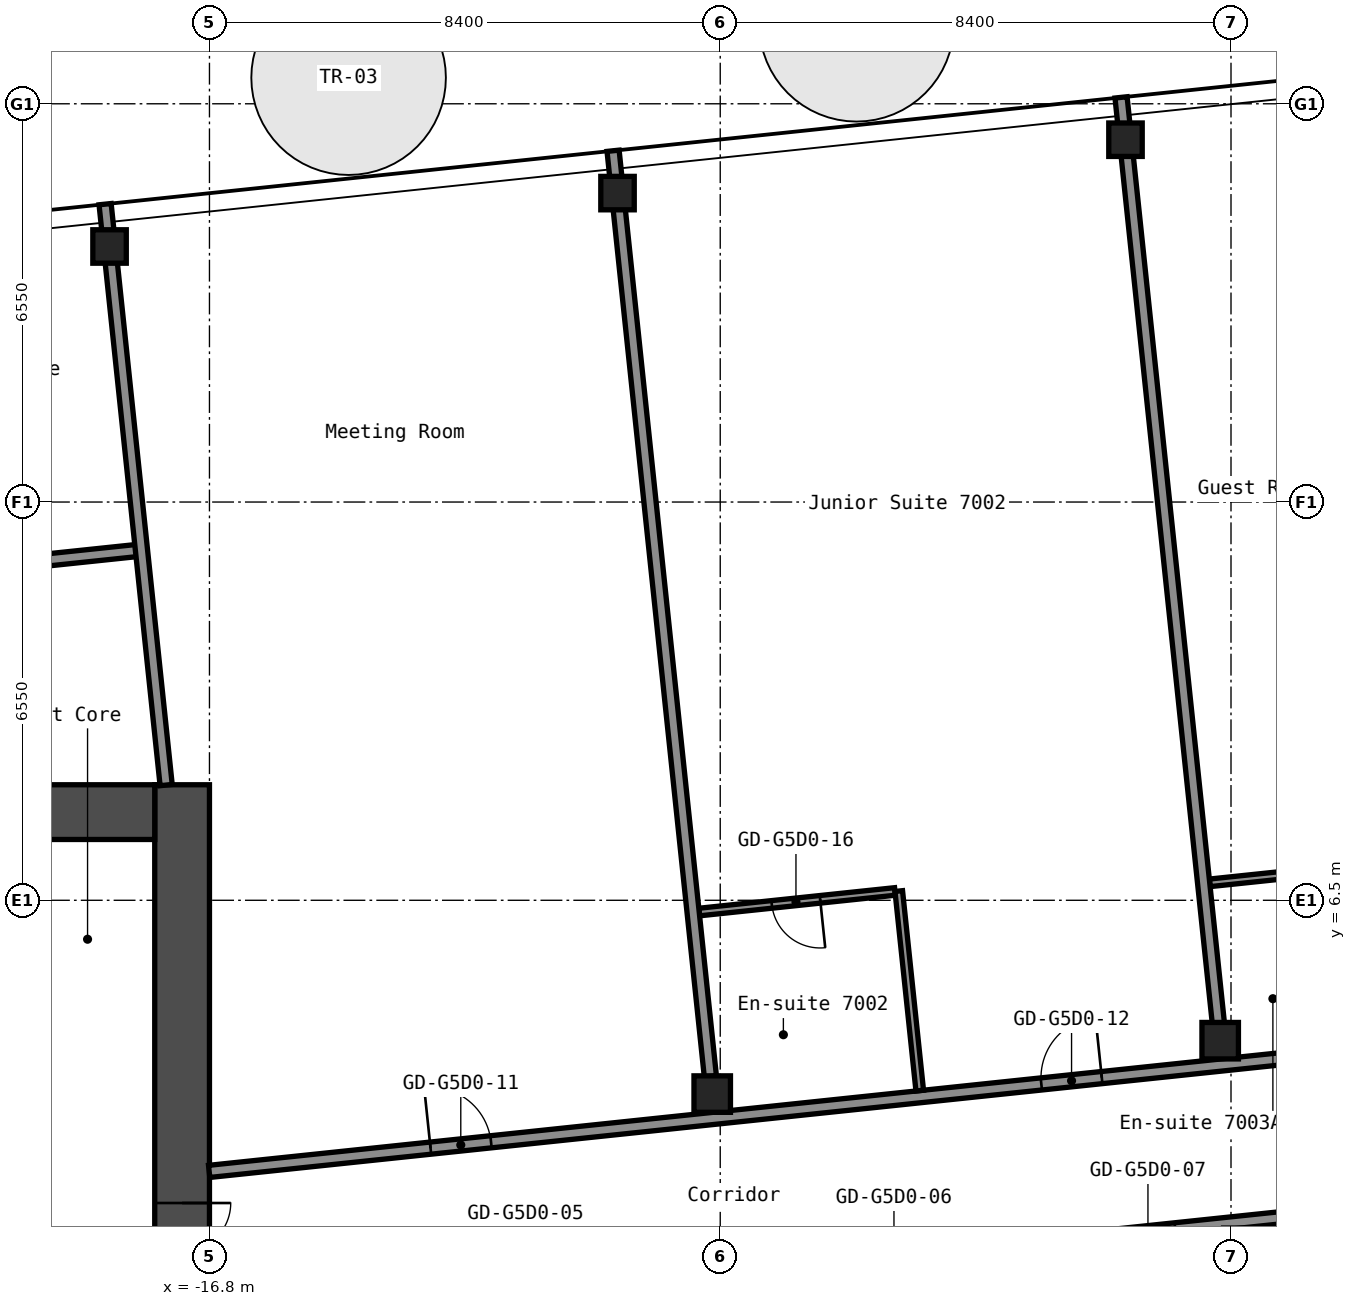
"""IFC4 building model, lengths in metres.
Left out: names, types, materials, properties, quantities, classifications, styles, units other than length and angle.
Written with IfcOpenShell. Run it as: python <this file> out.ifc"""

import sys

from ifc_helpers import new_model, si_unit, direction, frame, frame_2d, origin, origin_2d, place, context, subcontext, project, spatial, rectangle, hollow_rectangle, extrude, element, fill, save


model = new_model("IFC4")
c1 = context("Model", 3, precision=1e-05, world=origin(), true_north=direction((0.0, 1.0)))
c2 = subcontext(c1, "Body", "Model", "MODEL_VIEW")
j1 = project(units=[si_unit("LENGTHUNIT", "METRE"), si_unit("PLANEANGLEUNIT", "RADIAN")], contexts=[c1])
p1 = place(None, origin())
s1 = spatial("IfcSite", under=j1, at=p1, CompositionType="ELEMENT")
p2 = place(p1, origin())
s2 = spatial("IfcBuilding", under=s1, at=p2, CompositionType="ELEMENT")
p3 = place(p2, frame((0.0, 0.0, 248.6)))
s3 = spatial("IfcBuildingStorey", under=s2, at=p3, CompositionType="ELEMENT", Elevation=248.6)
p4 = place(p3, frame((-18.443, 17.253, 0.0), z_axis=(0.0, 0.0, 1.0), x_axis=(1.0, 0.0, 0.0)))
e1 = element("IfcColumn", 1, at=p4, inside=s3, PredefinedType="COLUMN", context=c2, shape_type="SweptSolid", body=[
    extrude(hollow_rectangle(XDim=0.55, YDim=0.55, WallThickness=0.022, InnerFilletRadius=0.033, OuterFilletRadius=0.055, at=origin_2d()), origin(), (0.0, 0.0, 1.0), 2.75),
])
p5 = place(p3, frame((-8.532, 3.312, 0.0), z_axis=(0.0, 0.0, 1.0), x_axis=(1.0, 0.0, 0.0)))
e2 = element("IfcColumn", 2, at=p5, inside=s3, PredefinedType="COLUMN", context=c2, shape_type="SweptSolid", body=[
    extrude(hollow_rectangle(XDim=0.6, YDim=0.6, WallThickness=0.025, InnerFilletRadius=0.038, OuterFilletRadius=0.062, at=origin_2d()), origin(), (0.0, 0.0, 1.0), 2.75),
])
p6 = place(p3, frame((-10.089, 18.131, 0.0), z_axis=(0.0, 0.0, 1.0), x_axis=(1.0, 0.0, 0.0)))
e3 = element("IfcColumn", 3, at=p6, inside=s3, PredefinedType="COLUMN", context=c2, shape_type="SweptSolid", body=[
    extrude(hollow_rectangle(XDim=0.55, YDim=0.55, WallThickness=0.022, InnerFilletRadius=0.033, OuterFilletRadius=0.055, at=origin_2d()), origin(), (0.0, 0.0, 1.0), 2.75),
])
p7 = place(p3, frame((-0.178, 4.191, 0.0), z_axis=(0.0, 0.0, 1.0), x_axis=(1.0, 0.0, 0.0)))
e4 = element("IfcColumn", 4, at=p7, inside=s3, PredefinedType="COLUMN", context=c2, shape_type="SweptSolid", body=[
    extrude(hollow_rectangle(XDim=0.6, YDim=0.6, WallThickness=0.025, InnerFilletRadius=0.038, OuterFilletRadius=0.062, at=origin_2d()), origin(), (0.0, 0.0, 1.0), 2.75),
])
p8 = place(p3, frame((-1.735, 19.009, 0.0), z_axis=(0.0, 0.0, 1.0), x_axis=(1.0, 0.0, 0.0)))
e5 = element("IfcColumn", 5, at=p8, inside=s3, PredefinedType="COLUMN", context=c2, shape_type="SweptSolid", body=[
    extrude(hollow_rectangle(XDim=0.55, YDim=0.55, WallThickness=0.022, InnerFilletRadius=0.033, OuterFilletRadius=0.055, at=origin_2d()), origin(), (0.0, 0.0, 1.0), 2.75),
])
p9 = place(p3, frame((-17.25, -8.4, 0.0), z_axis=(0.0, 0.0, 1.0), x_axis=(0.0, 1.0, 0.0)))
e6 = element("IfcWall", 6, at=p9, inside=s3, PredefinedType="SHEAR", context=c2, shape_type="SweptSolid", body=[
    extrude(rectangle(XDim=16.8, YDim=0.9, at=frame_2d((8.4, 0.0))), origin(), (0.0, 0.0, 1.0), 2.75),
])
p10 = place(p9, frame((8.321, 0.0, 0.0)))
e7 = element("IfcOpeningElement", 7, at=p10, cuts=e6, PredefinedType="OPENING", context=c2, shape_type="SweptSolid", body=[
    extrude(rectangle(XDim=1.6, YDim=2.1, at=frame_2d((0.8, 1.05))), frame((0.0, 0.46, 0.0), z_axis=(0.0, -1.0, 0.0), x_axis=(1.0, 0.0, 0.0)), (0.0, 0.0, 1.0), 0.92),
])
p11 = place(p3, frame((-32.7, 7.95, 0.0), z_axis=(0.0, 0.0, 1.0), x_axis=(1.0, 0.0, 0.0)))
e8 = element("IfcWall", 8, at=p11, inside=s3, PredefinedType="SHEAR", context=c2, shape_type="SweptSolid", body=[
    extrude(rectangle(XDim=15.0, YDim=0.9, at=frame_2d((7.5, 0.0))), origin(), (0.0, 0.0, 1.0), 2.75),
])
p12 = place(p11, frame((3.4, 0.0, 0.0)))
e9 = element("IfcOpeningElement", 9, at=p12, cuts=e8, PredefinedType="OPENING", context=c2, shape_type="SweptSolid", body=[
    extrude(rectangle(XDim=1.2, YDim=2.1, at=frame_2d((0.6, 1.05))), frame((0.0, 0.46, 0.0), z_axis=(0.0, -1.0, 0.0), x_axis=(1.0, 0.0, 0.0)), (0.0, 0.0, 1.0), 0.92),
])
p13 = place(p11, frame((0.75, 0.0, 0.0)))
e10 = element("IfcOpeningElement", 10, at=p13, cuts=e8, PredefinedType="OPENING", context=c2, shape_type="SweptSolid", body=[
    extrude(rectangle(XDim=0.9, YDim=2.1, at=frame_2d((0.45, 1.05))), frame((0.0, 0.46, 0.0), z_axis=(0.0, -1.0, 0.0), x_axis=(1.0, 0.0, 0.0)), (0.0, 0.0, 1.0), 0.92),
])
p14 = place(p3, frame((-16.572, -0.549, 0.0), z_axis=(0.0, 0.0, 1.0), x_axis=(0.994521146831, 0.104535584879, 0.0)))
e11 = element("IfcWall", 11, at=p14, inside=s3, PredefinedType="PARTITIONING", context=c2, shape_type="SweptSolid", body=[
    extrude(rectangle(XDim=33.561, YDim=0.2, at=frame_2d((16.78, 0.0))), origin(), (0.0, 0.0, 1.0), 2.75),
])
p15 = place(p14, frame((4.2, 0.0, 0.0)))
e12 = element("IfcOpeningElement", 12, at=p15, cuts=e11, PredefinedType="OPENING", context=c2, shape_type="SweptSolid", body=[
    extrude(rectangle(XDim=1.6, YDim=2.1, at=frame_2d((0.8, 1.05))), frame((0.0, 0.11, 0.0), z_axis=(0.0, -1.0, 0.0), x_axis=(1.0, 0.0, 0.0)), (0.0, 0.0, 1.0), 0.22),
])
p16 = place(p14, frame((10.64, 0.0, 0.0)))
e13 = element("IfcOpeningElement", 13, at=p16, cuts=e11, PredefinedType="OPENING", context=c2, shape_type="SweptSolid", body=[
    extrude(rectangle(XDim=0.9, YDim=2.1, at=frame_2d((0.45, 1.05))), frame((0.0, 0.11, 0.0), z_axis=(0.0, -1.0, 0.0), x_axis=(1.0, 0.0, 0.0)), (0.0, 0.0, 1.0), 0.22),
])
p17 = place(p14, frame((14.84, 0.0, 0.0)))
e14 = element("IfcOpeningElement", 14, at=p17, cuts=e11, PredefinedType="OPENING", context=c2, shape_type="SweptSolid", body=[
    extrude(rectangle(XDim=0.9, YDim=2.1, at=frame_2d((0.45, 1.05))), frame((0.0, 0.11, 0.0), z_axis=(0.0, -1.0, 0.0), x_axis=(1.0, 0.0, 0.0)), (0.0, 0.0, 1.0), 0.22),
])
p18 = place(p14, frame((19.65, 0.0, 0.0)))
e15 = element("IfcOpeningElement", 15, at=p18, cuts=e11, PredefinedType="OPENING", context=c2, shape_type="SweptSolid", body=[
    extrude(rectangle(XDim=1.0, YDim=2.1, at=frame_2d((0.5, 1.05))), frame((0.0, 0.11, 0.0), z_axis=(0.0, -1.0, 0.0), x_axis=(1.0, 0.0, 0.0)), (0.0, 0.0, 1.0), 0.22),
])
p19 = place(p14, frame((21.35, 0.0, 0.0)))
e16 = element("IfcOpeningElement", 16, at=p19, cuts=e11, PredefinedType="OPENING", context=c2, shape_type="SweptSolid", body=[
    extrude(rectangle(XDim=1.0, YDim=2.1, at=frame_2d((0.5, 1.05))), frame((0.0, 0.11, 0.0), z_axis=(0.0, -1.0, 0.0), x_axis=(1.0, 0.0, 0.0)), (0.0, 0.0, 1.0), 0.22),
])
p20 = place(p14, frame((29.4, 0.0, 0.0)))
e17 = element("IfcOpeningElement", 17, at=p20, cuts=e11, PredefinedType="OPENING", context=c2, shape_type="SweptSolid", body=[
    extrude(rectangle(XDim=1.6, YDim=2.1, at=frame_2d((0.8, 1.05))), frame((0.0, 0.11, 0.0), z_axis=(0.0, -1.0, 0.0), x_axis=(1.0, 0.0, 0.0)), (0.0, 0.0, 1.0), 0.22),
])
p21 = place(p3, frame((-16.805, 2.041, 0.0), z_axis=(0.0, 0.0, 1.0), x_axis=(0.994521146831, 0.104535584879, 0.0)))
e18 = element("IfcWall", 18, at=p21, inside=s3, PredefinedType="PARTITIONING", context=c2, shape_type="SweptSolid", body=[
    extrude(rectangle(XDim=33.561, YDim=0.2, at=frame_2d((16.78, 0.0))), origin(), (0.0, 0.0, 1.0), 2.75),
])
p22 = place(p21, frame((3.661, 0.0, 0.0)))
e19 = element("IfcOpeningElement", 19, at=p22, cuts=e18, PredefinedType="OPENING", context=c2, shape_type="SweptSolid", body=[
    extrude(rectangle(XDim=1.0, YDim=2.1, at=frame_2d((0.5, 1.05))), frame((0.0, 0.11, 0.0), z_axis=(0.0, -1.0, 0.0), x_axis=(1.0, 0.0, 0.0)), (0.0, 0.0, 1.0), 0.22),
])
p23 = place(p21, frame((13.761, 0.0, 0.0)))
e20 = element("IfcOpeningElement", 20, at=p23, cuts=e18, PredefinedType="OPENING", context=c2, shape_type="SweptSolid", body=[
    extrude(rectangle(XDim=1.0, YDim=2.1, at=frame_2d((0.5, 1.05))), frame((0.0, 0.11, 0.0), z_axis=(0.0, -1.0, 0.0), x_axis=(1.0, 0.0, 0.0)), (0.0, 0.0, 1.0), 0.22),
])
p24 = place(p21, frame((19.611, 0.0, 0.0)))
e21 = element("IfcOpeningElement", 21, at=p24, cuts=e18, PredefinedType="OPENING", context=c2, shape_type="SweptSolid", body=[
    extrude(rectangle(XDim=1.0, YDim=2.1, at=frame_2d((0.5, 1.05))), frame((0.0, 0.11, 0.0), z_axis=(0.0, -1.0, 0.0), x_axis=(1.0, 0.0, 0.0)), (0.0, 0.0, 1.0), 0.22),
])
p25 = place(p21, frame((21.311, 0.0, 0.0)))
e22 = element("IfcOpeningElement", 22, at=p25, cuts=e18, PredefinedType="OPENING", context=c2, shape_type="SweptSolid", body=[
    extrude(rectangle(XDim=1.0, YDim=2.1, at=frame_2d((0.5, 1.05))), frame((0.0, 0.11, 0.0), z_axis=(0.0, -1.0, 0.0), x_axis=(1.0, 0.0, 0.0)), (0.0, 0.0, 1.0), 0.22),
])
p26 = place(p21, frame((28.861, 0.0, 0.0)))
e23 = element("IfcOpeningElement", 23, at=p26, cuts=e18, PredefinedType="OPENING", context=c2, shape_type="SweptSolid", body=[
    extrude(rectangle(XDim=1.0, YDim=2.1, at=frame_2d((0.5, 1.05))), frame((0.0, 0.11, 0.0), z_axis=(0.0, -1.0, 0.0), x_axis=(1.0, 0.0, 0.0)), (0.0, 0.0, 1.0), 0.22),
])
p27 = place(p3, frame((-0.35, 6.787, 0.0), z_axis=(0.0, 0.0, 1.0), x_axis=(0.994519751088, 0.104548862722, 0.0)))
e24 = element("IfcWall", 24, at=p27, inside=s3, PredefinedType="PARTITIONING", context=c2, shape_type="SweptSolid", body=[
    extrude(rectangle(XDim=2.337, YDim=0.125, at=frame_2d((1.169, 0.0))), origin(), (0.0, 0.0, 1.0), 2.75),
])
p28 = place(p3, frame((-8.746, 6.307, 0.0), z_axis=(0.0, 0.0, 1.0), x_axis=(0.994522794159, 0.104519911488, 0.0)))
e25 = element("IfcWall", 25, at=p28, inside=s3, PredefinedType="PARTITIONING", context=c2, shape_type="SweptSolid", body=[
    extrude(rectangle(XDim=3.238, YDim=0.125, at=frame_2d((1.619, 0.0))), origin(), (0.0, 0.0, 1.0), 2.75),
])
p29 = place(p28, frame((1.2, 0.0, 0.0)))
e26 = element("IfcOpeningElement", 26, at=p29, cuts=e25, PredefinedType="OPENING", context=c2, shape_type="SweptSolid", body=[
    extrude(rectangle(XDim=0.8, YDim=2.1, at=frame_2d((0.4, 1.05))), frame((0.0, 0.073, 0.0), z_axis=(0.0, -1.0, 0.0), x_axis=(1.0, 0.0, 0.0)), (0.0, 0.0, 1.0), 0.145),
])
p30 = place(p3, frame((-39.102, 10.034, 0.0), z_axis=(0.0, 0.0, 1.0), x_axis=(0.994522585465, 0.104521897229, 0.0)))
e27 = element("IfcWall", 27, at=p30, inside=s3, PredefinedType="PARTITIONING", context=c2, shape_type="SweptSolid", body=[
    extrude(rectangle(XDim=21.3, YDim=0.2, at=frame_2d((10.65, 0.0))), origin(), (0.0, 0.0, 1.0), 2.75),
])
p31 = place(p30, frame((3.05, 0.0, 0.0)))
e28 = element("IfcOpeningElement", 28, at=p31, cuts=e27, PredefinedType="OPENING", context=c2, shape_type="SweptSolid", body=[
    extrude(rectangle(XDim=1.0, YDim=2.1, at=frame_2d((0.5, 1.05))), frame((0.0, 0.11, 0.0), z_axis=(0.0, -1.0, 0.0), x_axis=(1.0, 0.0, 0.0)), (0.0, 0.0, 1.0), 0.22),
])
p32 = place(p30, frame((5.98, 0.0, 0.0)))
e29 = element("IfcOpeningElement", 29, at=p32, cuts=e27, PredefinedType="OPENING", context=c2, shape_type="SweptSolid", body=[
    extrude(rectangle(XDim=0.9, YDim=2.1, at=frame_2d((0.45, 1.05))), frame((0.0, 0.11, 0.0), z_axis=(0.0, -1.0, 0.0), x_axis=(1.0, 0.0, 0.0)), (0.0, 0.0, 1.0), 0.22),
])
p33 = place(p30, frame((10.18, 0.0, 0.0)))
e30 = element("IfcOpeningElement", 30, at=p33, cuts=e27, PredefinedType="OPENING", context=c2, shape_type="SweptSolid", body=[
    extrude(rectangle(XDim=0.9, YDim=2.1, at=frame_2d((0.45, 1.05))), frame((0.0, 0.11, 0.0), z_axis=(0.0, -1.0, 0.0), x_axis=(1.0, 0.0, 0.0)), (0.0, 0.0, 1.0), 0.22),
])
p34 = place(p30, frame((14.13, 0.0, 0.0)))
e31 = element("IfcOpeningElement", 31, at=p34, cuts=e27, PredefinedType="OPENING", context=c2, shape_type="SweptSolid", body=[
    extrude(rectangle(XDim=0.9, YDim=2.1, at=frame_2d((0.45, 1.05))), frame((0.0, 0.11, 0.0), z_axis=(0.0, -1.0, 0.0), x_axis=(1.0, 0.0, 0.0)), (0.0, 0.0, 1.0), 0.22),
])
p35 = place(p30, frame((18.33, 0.0, 0.0)))
e32 = element("IfcOpeningElement", 32, at=p35, cuts=e27, PredefinedType="OPENING", context=c2, shape_type="SweptSolid", body=[
    extrude(rectangle(XDim=0.9, YDim=2.1, at=frame_2d((0.45, 1.05))), frame((0.0, 0.11, 0.0), z_axis=(0.0, -1.0, 0.0), x_axis=(1.0, 0.0, 0.0)), (0.0, 0.0, 1.0), 0.22),
])
p36 = place(p3, frame((-17.512, 8.395, 0.0), z_axis=(0.0, 0.0, 1.0), x_axis=(-0.104524714473, 0.994522289375, 0.0)))
e33 = element("IfcWall", 33, at=p36, inside=s3, PredefinedType="PARTITIONING", context=c2, shape_type="SweptSolid", body=[
    extrude(rectangle(XDim=9.607, YDim=0.2, at=frame_2d((4.803, 0.0))), origin(), (0.0, 0.0, 1.0), 2.75),
])
p37 = place(p3, frame((-8.562, 3.603, 0.0), z_axis=(0.0, 0.0, 1.0), x_axis=(-0.104523729364, 0.99452239291, 0.0)))
e34 = element("IfcWall", 34, at=p37, inside=s3, PredefinedType="PARTITIONING", context=c2, shape_type="SweptSolid", body=[
    extrude(rectangle(XDim=15.308, YDim=0.2, at=frame_2d((7.654, 0.0))), origin(), (0.0, 0.0, 1.0), 2.75),
])
p38 = place(p3, frame((-5.119, 3.37, 0.0), z_axis=(0.0, 0.0, 1.0), x_axis=(-0.104534592565, 0.994521251134, 0.0)))
e35 = element("IfcWall", 35, at=p38, inside=s3, PredefinedType="PARTITIONING", context=c2, shape_type="SweptSolid", body=[
    extrude(rectangle(XDim=3.3, YDim=0.125, at=frame_2d((1.65, 0.0))), origin(), (0.0, 0.0, 1.0), 2.75),
])
p39 = place(p3, frame((-0.208, 4.481, 0.0), z_axis=(0.0, 0.0, 1.0), x_axis=(-0.104523729364, 0.99452239291, 0.0)))
e36 = element("IfcWall", 36, at=p39, inside=s3, PredefinedType="PARTITIONING", context=c2, shape_type="SweptSolid", body=[
    extrude(rectangle(XDim=15.308, YDim=0.2, at=frame_2d((7.654, 0.0))), origin(), (0.0, 0.0, 1.0), 2.75),
])
p40 = place(p10, origin())
e37 = element("IfcDoor", 37, at=p40, inside=s3, OperationType="DOUBLE_DOOR_SINGLE_SWING", PredefinedType="DOOR", context=c2, shape_type="SweptSolid", body=[
    extrude(rectangle(XDim=1.6, YDim=2.1, at=frame_2d((0.8, 1.05))), frame((0.0, 0.025, 0.0), z_axis=(0.0, -1.0, 0.0), x_axis=(1.0, 0.0, 0.0)), (0.0, 0.0, 1.0), 0.05),
])
fill(e7, e37)
p41 = place(p22, origin())
e38 = element("IfcDoor", 38, at=p41, inside=s3, OperationType="SINGLE_SWING_RIGHT", PredefinedType="DOOR", context=c2, shape_type="SweptSolid", body=[
    extrude(rectangle(XDim=1.0, YDim=2.1, at=frame_2d((0.5, 1.05))), frame((0.0, 0.025, 0.0), z_axis=(0.0, -1.0, 0.0), x_axis=(1.0, 0.0, 0.0)), (0.0, 0.0, 1.0), 0.05),
])
fill(e19, e38)
p42 = place(p23, origin())
e39 = element("IfcDoor", 39, at=p42, inside=s3, OperationType="SINGLE_SWING_LEFT", PredefinedType="DOOR", context=c2, shape_type="SweptSolid", body=[
    extrude(rectangle(XDim=1.0, YDim=2.1, at=frame_2d((0.5, 1.05))), frame((0.0, 0.025, 0.0), z_axis=(0.0, -1.0, 0.0), x_axis=(1.0, 0.0, 0.0)), (0.0, 0.0, 1.0), 0.05),
])
fill(e20, e39)
p43 = place(p29, origin())
e40 = element("IfcDoor", 40, at=p43, inside=s3, OperationType="SINGLE_SWING_RIGHT", PredefinedType="DOOR", context=c2, shape_type="SweptSolid", body=[
    extrude(rectangle(XDim=0.8, YDim=2.1, at=frame_2d((0.4, 1.05))), frame((0.0, 0.025, 0.0), z_axis=(0.0, -1.0, 0.0), x_axis=(1.0, 0.0, 0.0)), (0.0, 0.0, 1.0), 0.05),
])
fill(e26, e40)
save(model, sys.argv[1])
